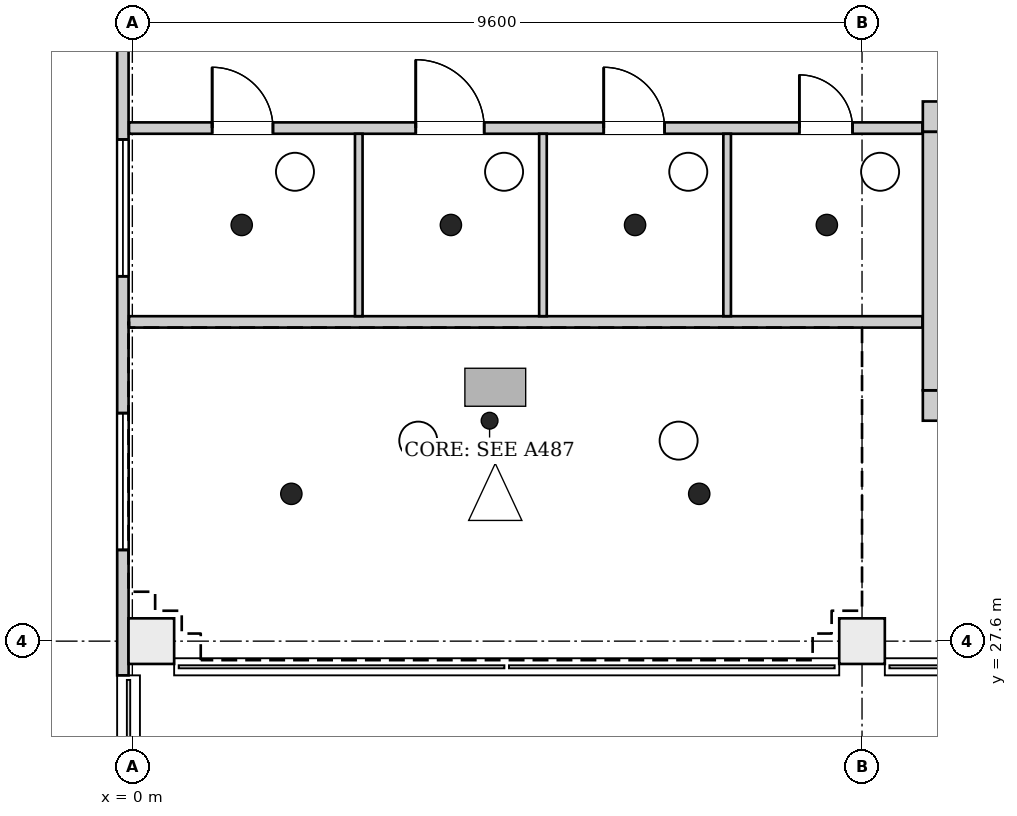
"""IFC4 building model, lengths in metres.
Left out: names, types, materials, properties, quantities, classifications, styles, units other than length and angle.
Written with IfcOpenShell. Run it as: python <this file> out.ifc"""

import sys

from ifc_helpers import new_model, si_unit, direction, frame, frame_2d, origin, origin_2d, place, context, subcontext, project, spatial, rectangle, extrude, element, fill, save


model = new_model("IFC4")
c1 = context("Model", 3, precision=1e-05, world=origin(), true_north=direction((0.0, 1.0)))
c2 = subcontext(c1, "Body", "Model", "MODEL_VIEW")
j1 = project(units=[si_unit("LENGTHUNIT", "METRE"), si_unit("PLANEANGLEUNIT", "RADIAN")], contexts=[c1])
p1 = place(None, origin())
s1 = spatial("IfcSite", under=j1, at=p1, CompositionType="ELEMENT")
p2 = place(p1, origin())
s2 = spatial("IfcBuilding", under=s1, at=p2, CompositionType="ELEMENT")
p3 = place(p2, frame((0.0, 0.0, 73.9)))
s3 = spatial("IfcBuildingStorey", under=s2, at=p3, CompositionType="ELEMENT", Elevation=73.9)
p4 = place(p3, frame((10.4, 30.7, 0.0), z_axis=(0.0, 0.0, 1.0), x_axis=(1.0, 0.0, 0.0)))
e1 = element("IfcWall", 1, at=p4, inside=s3, PredefinedType="SHEAR", context=c2, shape_type="SweptSolid", body=[
    extrude(rectangle(XDim=3.1, YDim=0.4, at=frame_2d((1.55, 0.0))), origin(), (0.0, 0.0, 1.0), 4.2),
])
p5 = place(p4, frame((0.95, 0.0, 0.0)))
e2 = element("IfcOpeningElement", 2, at=p5, cuts=e1, PredefinedType="OPENING", context=c2, shape_type="SweptSolid", body=[
    extrude(rectangle(XDim=1.2, YDim=2.1, at=frame_2d((0.6, 1.05))), frame((0.0, 0.21, 0.0), z_axis=(0.0, -1.0, 0.0), x_axis=(1.0, 0.0, 0.0)), (0.0, 0.0, 1.0), 0.42),
])
p6 = place(p3, frame((10.4, 34.5, 0.0), z_axis=(0.0, 0.0, 1.0), x_axis=(1.0, 0.0, 0.0)))
e3 = element("IfcWall", 3, at=p6, inside=s3, PredefinedType="SHEAR", context=c2, shape_type="SweptSolid", body=[
    extrude(rectangle(XDim=3.1, YDim=0.4, at=frame_2d((1.55, 0.0))), origin(), (0.0, 0.0, 1.0), 4.2),
])
p7 = place(p3, frame((10.6, 30.9, 0.0), z_axis=(0.0, 0.0, 1.0), x_axis=(0.0, 1.0, 0.0)))
e4 = element("IfcWall", 4, at=p7, inside=s3, PredefinedType="SHEAR", context=c2, shape_type="SweptSolid", body=[
    extrude(rectangle(XDim=3.4, YDim=0.4, at=frame_2d((1.7, 0.0))), origin(), (0.0, 0.0, 1.0), 4.2),
])
for number, where, z_axis, x_axis in (
    (5, (0.25, 27.6, 0.0), (0.0, 0.0, 1.0), (1.0, 0.0, 0.0)),
    (6, (9.6, 27.6, 0.0), (0.0, 0.0, 1.0), (1.0, 0.0, 0.0)),
):
    element("IfcColumn", number, at=place(p3, frame(where, z_axis=z_axis, x_axis=x_axis)), inside=s3, PredefinedType="COLUMN", context=c2, shape_type="SweptSolid", body=[
        extrude(rectangle(XDim=0.6, YDim=0.6, at=origin_2d()), origin(), (0.0, 0.0, 1.0), 4.2),
    ])
p8 = place(p3, frame((-0.125, 46.45, 0.0), z_axis=(0.0, 0.0, 1.0), x_axis=(0.0, -1.0, 0.0)))
e7 = element("IfcWall", 7, at=p8, inside=s3, PredefinedType="ELEMENTEDWALL", context=c2, shape_type="SweptSolid", body=[
    extrude(rectangle(XDim=19.3, YDim=0.15, at=frame_2d((9.65, 0.0))), origin(), (0.0, 0.0, 1.0), 3.9),
])
p9 = place(p8, frame((15.85, 0.0, 0.9)))
e8 = element("IfcOpeningElement", 8, at=p9, cuts=e7, PredefinedType="OPENING", context=c2, shape_type="SweptSolid", body=[
    extrude(rectangle(XDim=1.8, YDim=2.6, at=frame_2d((0.9, 1.3))), frame((0.0, 0.085, 0.0), z_axis=(0.0, -1.0, 0.0), x_axis=(1.0, 0.0, 0.0)), (0.0, 0.0, 1.0), 0.17),
])
p10 = place(p8, frame((12.25, 0.0, 0.9)))
e9 = element("IfcOpeningElement", 9, at=p10, cuts=e7, PredefinedType="OPENING", context=c2, shape_type="SweptSolid", body=[
    extrude(rectangle(XDim=1.8, YDim=2.6, at=frame_2d((0.9, 1.3))), frame((0.0, 0.085, 0.0), z_axis=(0.0, -1.0, 0.0), x_axis=(1.0, 0.0, 0.0)), (0.0, 0.0, 1.0), 0.17),
])
p11 = place(p8, frame((8.65, 0.0, 0.9)))
e10 = element("IfcOpeningElement", 10, at=p11, cuts=e7, PredefinedType="OPENING", context=c2, shape_type="SweptSolid", body=[
    extrude(rectangle(XDim=1.8, YDim=2.6, at=frame_2d((0.9, 1.3))), frame((0.0, 0.085, 0.0), z_axis=(0.0, -1.0, 0.0), x_axis=(1.0, 0.0, 0.0)), (0.0, 0.0, 1.0), 0.17),
])
p12 = place(p8, frame((5.05, 0.0, 0.9)))
e11 = element("IfcOpeningElement", 11, at=p12, cuts=e7, PredefinedType="OPENING", context=c2, shape_type="SweptSolid", body=[
    extrude(rectangle(XDim=1.8, YDim=2.6, at=frame_2d((0.9, 1.3))), frame((0.0, 0.085, 0.0), z_axis=(0.0, -1.0, 0.0), x_axis=(1.0, 0.0, 0.0)), (0.0, 0.0, 1.0), 0.17),
])
p13 = place(p8, frame((1.45, 0.0, 0.9)))
e12 = element("IfcOpeningElement", 12, at=p13, cuts=e7, PredefinedType="OPENING", context=c2, shape_type="SweptSolid", body=[
    extrude(rectangle(XDim=1.8, YDim=2.6, at=frame_2d((0.9, 1.3))), frame((0.0, 0.085, 0.0), z_axis=(0.0, -1.0, 0.0), x_axis=(1.0, 0.0, 0.0)), (0.0, 0.0, 1.0), 0.17),
])
p14 = place(p3, frame((-0.044, 31.8, 0.0), z_axis=(0.0, 0.0, 1.0), x_axis=(1.0, 0.0, 0.0)))
e13 = element("IfcWall", 13, at=p14, inside=s3, PredefinedType="PARTITIONING", context=c2, shape_type="SweptSolid", body=[
    extrude(rectangle(XDim=10.438, YDim=0.15, at=frame_2d((5.219, 0.0))), origin(), (0.0, 0.0, 1.0), 3.9),
])
p15 = place(p3, frame((-0.044, 34.35, 0.0), z_axis=(0.0, 0.0, 1.0), x_axis=(1.0, 0.0, 0.0)))
e14 = element("IfcWall", 14, at=p15, inside=s3, PredefinedType="PARTITIONING", context=c2, shape_type="SweptSolid", body=[
    extrude(rectangle(XDim=10.438, YDim=0.15, at=frame_2d((5.219, 0.0))), origin(), (0.0, 0.0, 1.0), 3.9),
])
p16 = place(p15, frame((1.094, 0.0, 0.0)))
e15 = element("IfcOpeningElement", 15, at=p16, cuts=e14, PredefinedType="OPENING", context=c2, shape_type="SweptSolid", body=[
    extrude(rectangle(XDim=0.8, YDim=2.1, at=frame_2d((0.4, 1.05))), frame((0.0, 0.085, 0.0), z_axis=(0.0, -1.0, 0.0), x_axis=(1.0, 0.0, 0.0)), (0.0, 0.0, 1.0), 0.17),
])
p17 = place(p15, frame((3.773, 0.0, 0.0)))
e16 = element("IfcOpeningElement", 16, at=p17, cuts=e14, PredefinedType="OPENING", context=c2, shape_type="SweptSolid", body=[
    extrude(rectangle(XDim=0.9, YDim=2.1, at=frame_2d((0.45, 1.05))), frame((0.0, 0.085, 0.0), z_axis=(0.0, -1.0, 0.0), x_axis=(1.0, 0.0, 0.0)), (0.0, 0.0, 1.0), 0.17),
])
p18 = place(p15, frame((6.246, 0.0, 0.0)))
e17 = element("IfcOpeningElement", 17, at=p18, cuts=e14, PredefinedType="OPENING", context=c2, shape_type="SweptSolid", body=[
    extrude(rectangle(XDim=0.8, YDim=2.1, at=frame_2d((0.4, 1.05))), frame((0.0, 0.085, 0.0), z_axis=(0.0, -1.0, 0.0), x_axis=(1.0, 0.0, 0.0)), (0.0, 0.0, 1.0), 0.17),
])
p19 = place(p15, frame((8.819, 0.0, 0.0)))
e18 = element("IfcOpeningElement", 18, at=p19, cuts=e14, PredefinedType="OPENING", context=c2, shape_type="SweptSolid", body=[
    extrude(rectangle(XDim=0.7, YDim=2.1, at=frame_2d((0.35, 1.05))), frame((0.0, 0.085, 0.0), z_axis=(0.0, -1.0, 0.0), x_axis=(1.0, 0.0, 0.0)), (0.0, 0.0, 1.0), 0.17),
])
for number, where, z_axis, x_axis in (
    (19, (2.979, 31.875, 0.0), (0.0, 0.0, 1.0), (0.0, 1.0, 0.0)),
    (20, (5.402, 31.875, 0.0), (0.0, 0.0, 1.0), (0.0, 1.0, 0.0)),
    (21, (7.825, 31.875, 0.0), (0.0, 0.0, 1.0), (0.0, 1.0, 0.0)),
):
    element("IfcWall", number, at=place(p3, frame(where, z_axis=z_axis, x_axis=x_axis)), inside=s3, PredefinedType="PARTITIONING", context=c2, shape_type="SweptSolid", body=[
        extrude(rectangle(XDim=2.4, YDim=0.1, at=frame_2d((1.2, 0.0))), origin(), (0.0, 0.0, 1.0), 3.9),
    ])
p20 = place(p9, origin())
e22 = element("IfcWindow", 22, at=p20, inside=s3, PartitioningType="SINGLE_PANEL", PredefinedType="WINDOW", context=c2, shape_type="SweptSolid", body=[
    extrude(rectangle(XDim=1.8, YDim=2.6, at=frame_2d((0.9, 1.3))), frame((0.0, 0.03, 0.0), z_axis=(0.0, -1.0, 0.0), x_axis=(1.0, 0.0, 0.0)), (0.0, 0.0, 1.0), 0.06),
])
fill(e8, e22)
p21 = place(p10, origin())
e23 = element("IfcWindow", 23, at=p21, inside=s3, PartitioningType="SINGLE_PANEL", PredefinedType="WINDOW", context=c2, shape_type="SweptSolid", body=[
    extrude(rectangle(XDim=1.8, YDim=2.6, at=frame_2d((0.9, 1.3))), frame((0.0, 0.03, 0.0), z_axis=(0.0, -1.0, 0.0), x_axis=(1.0, 0.0, 0.0)), (0.0, 0.0, 1.0), 0.06),
])
fill(e9, e23)
p22 = place(p16, origin())
e24 = element("IfcDoor", 24, at=p22, inside=s3, OperationType="SINGLE_SWING_RIGHT", PredefinedType="DOOR", context=c2, shape_type="SweptSolid", body=[
    extrude(rectangle(XDim=0.8, YDim=2.1, at=frame_2d((0.4, 1.05))), frame((0.0, 0.025, 0.0), z_axis=(0.0, -1.0, 0.0), x_axis=(1.0, 0.0, 0.0)), (0.0, 0.0, 1.0), 0.05),
])
fill(e15, e24)
p23 = place(p17, origin())
e25 = element("IfcDoor", 25, at=p23, inside=s3, OperationType="SINGLE_SWING_LEFT", PredefinedType="DOOR", context=c2, shape_type="SweptSolid", body=[
    extrude(rectangle(XDim=0.9, YDim=2.1, at=frame_2d((0.45, 1.05))), frame((0.0, 0.025, 0.0), z_axis=(0.0, -1.0, 0.0), x_axis=(1.0, 0.0, 0.0)), (0.0, 0.0, 1.0), 0.05),
])
fill(e16, e25)
p24 = place(p18, origin())
e26 = element("IfcDoor", 26, at=p24, inside=s3, OperationType="SINGLE_SWING_LEFT", PredefinedType="DOOR", context=c2, shape_type="SweptSolid", body=[
    extrude(rectangle(XDim=0.8, YDim=2.1, at=frame_2d((0.4, 1.05))), frame((0.0, 0.025, 0.0), z_axis=(0.0, -1.0, 0.0), x_axis=(1.0, 0.0, 0.0)), (0.0, 0.0, 1.0), 0.05),
])
fill(e17, e26)
p25 = place(p19, origin())
e27 = element("IfcDoor", 27, at=p25, inside=s3, OperationType="SINGLE_SWING_LEFT", PredefinedType="DOOR", context=c2, shape_type="SweptSolid", body=[
    extrude(rectangle(XDim=0.7, YDim=2.1, at=frame_2d((0.35, 1.05))), frame((0.0, 0.025, 0.0), z_axis=(0.0, -1.0, 0.0), x_axis=(1.0, 0.0, 0.0)), (0.0, 0.0, 1.0), 0.05),
])
fill(e18, e27)
save(model, sys.argv[1])
